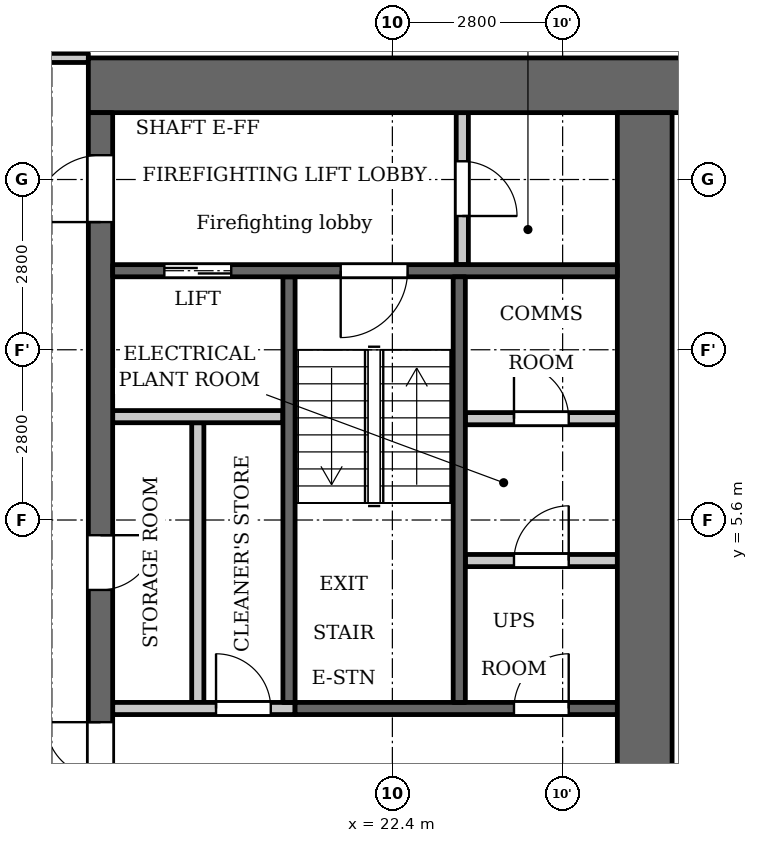
"""IFC4 building model, lengths in metres.
Left out: names, types, materials, properties, quantities, classifications, styles, units other than length and angle.
Written with IfcOpenShell. Run it as: python <this file> out.ifc"""

import sys

from ifc_helpers import new_model, si_unit, direction, frame, frame_2d, origin, place, context, subcontext, project, spatial, rectangle, extrude, element, fill, save


model = new_model("IFC4")
c1 = context("Model", 3, precision=1e-05, world=origin(), true_north=direction((0.0, 1.0)))
c2 = subcontext(c1, "Body", "Model", "MODEL_VIEW")
j1 = project(units=[si_unit("LENGTHUNIT", "METRE"), si_unit("PLANEANGLEUNIT", "RADIAN")], contexts=[c1])
p1 = place(None, origin())
s1 = spatial("IfcSite", under=j1, at=p1, CompositionType="ELEMENT")
p2 = place(p1, origin())
s2 = spatial("IfcBuilding", under=s1, at=p2, CompositionType="ELEMENT")
p3 = place(p2, frame((0.0, 0.0, 44.5)))
s3 = spatial("IfcBuildingStorey", under=s2, at=p3, CompositionType="ELEMENT", Elevation=44.5)
p4 = place(p3, frame((20.7, 2.6, 0.0), z_axis=(0.0, 0.0, 1.0), x_axis=(0.0, 1.0, 0.0)))
e1 = element("IfcWall", 1, at=p4, inside=s3, PredefinedType="SHEAR", context=c2, shape_type="SweptSolid", body=[
    extrude(rectangle(XDim=7.0, YDim=0.2, at=frame_2d((3.5, 0.0))), origin(), (0.0, 0.0, 1.0), 3.2),
])
p5 = place(p3, frame((20.8, 2.5, 0.0), z_axis=(0.0, 0.0, 1.0), x_axis=(1.0, 0.0, 0.0)))
e2 = element("IfcWall", 2, at=p5, inside=s3, PredefinedType="SHEAR", context=c2, shape_type="SweptSolid", body=[
    extrude(rectangle(XDim=5.3, YDim=0.2, at=frame_2d((2.65, 0.0))), origin(), (0.0, 0.0, 1.0), 3.2),
])
p6 = place(p5, frame((3.6, 0.0, 0.0)))
e3 = element("IfcOpeningElement", 3, at=p6, cuts=e2, PredefinedType="OPENING", context=c2, shape_type="SweptSolid", body=[
    extrude(rectangle(XDim=0.9, YDim=2.1, at=frame_2d((0.45, 1.05))), frame((0.0, 0.11, 0.0), z_axis=(0.0, -1.0, 0.0), x_axis=(1.0, 0.0, 0.0)), (0.0, 0.0, 1.0), 0.22),
])
p7 = place(p3, frame((17.4, 12.75, 0.0), z_axis=(0.0, 0.0, 1.0), x_axis=(1.0, 0.0, 0.0)))
e4 = element("IfcWall", 4, at=p7, inside=s3, PredefinedType="SHEAR", context=c2, shape_type="SweptSolid", body=[
    extrude(rectangle(XDim=10.4, YDim=0.9, at=frame_2d((5.2, 0.0))), origin(), (0.0, 0.0, 1.0), 3.2),
])
p8 = place(p3, frame((19.2, 2.6, 0.0), z_axis=(0.0, 0.0, 1.0), x_axis=(0.0, 1.0, 0.0)))
e5 = element("IfcWall", 5, at=p8, inside=s3, PredefinedType="PARTITIONING", context=c2, shape_type="SweptSolid", body=[
    extrude(rectangle(XDim=4.6, YDim=0.2, at=frame_2d((2.3, 0.0))), origin(), (0.0, 0.0, 1.0), 3.2),
])
p9 = place(p3, frame((17.6, -12.3, 0.0), z_axis=(0.0, 0.0, 1.0), x_axis=(0.0, 1.0, 0.0)))
e6 = element("IfcWall", 6, at=p9, inside=s3, PredefinedType="SHEAR", context=c2, shape_type="SweptSolid", body=[
    extrude(rectangle(XDim=24.6, YDim=0.4, at=frame_2d((12.3, 0.0))), origin(), (0.0, 0.0, 1.0), 3.2),
])
p10 = place(p9, frame((6.0, 0.0, 0.0)))
e7 = element("IfcOpeningElement", 7, at=p10, cuts=e6, PredefinedType="OPENING", context=c2, shape_type="SweptSolid", body=[
    extrude(rectangle(XDim=1.1, YDim=2.1, at=frame_2d((0.55, 1.05))), frame((0.0, 0.21, 0.0), z_axis=(0.0, -1.0, 0.0), x_axis=(1.0, 0.0, 0.0)), (0.0, 0.0, 1.0), 0.42),
])
p11 = place(p9, frame((8.4, 0.0, 0.0)))
e8 = element("IfcOpeningElement", 8, at=p11, cuts=e6, PredefinedType="OPENING", context=c2, shape_type="SweptSolid", body=[
    extrude(rectangle(XDim=1.1, YDim=2.1, at=frame_2d((0.55, 1.05))), frame((0.0, 0.21, 0.0), z_axis=(0.0, -1.0, 0.0), x_axis=(1.0, 0.0, 0.0)), (0.0, 0.0, 1.0), 0.42),
])
p12 = place(p9, frame((10.8, 0.0, 0.0)))
e9 = element("IfcOpeningElement", 9, at=p12, cuts=e6, PredefinedType="OPENING", context=c2, shape_type="SweptSolid", body=[
    extrude(rectangle(XDim=1.1, YDim=2.1, at=frame_2d((0.55, 1.05))), frame((0.0, 0.21, 0.0), z_axis=(0.0, -1.0, 0.0), x_axis=(1.0, 0.0, 0.0)), (0.0, 0.0, 1.0), 0.42),
])
p13 = place(p9, frame((16.75, 0.0, 0.0)))
e10 = element("IfcOpeningElement", 10, at=p13, cuts=e6, PredefinedType="OPENING", context=c2, shape_type="SweptSolid", body=[
    extrude(rectangle(XDim=0.9, YDim=2.1, at=frame_2d((0.45, 1.05))), frame((0.0, 0.21, 0.0), z_axis=(0.0, -1.0, 0.0), x_axis=(1.0, 0.0, 0.0)), (0.0, 0.0, 1.0), 0.42),
])
p14 = place(p9, frame((22.8, 0.0, 0.0)))
e11 = element("IfcOpeningElement", 11, at=p14, cuts=e6, PredefinedType="OPENING", context=c2, shape_type="SweptSolid", body=[
    extrude(rectangle(XDim=1.1, YDim=2.1, at=frame_2d((0.55, 1.05))), frame((0.0, 0.21, 0.0), z_axis=(0.0, -1.0, 0.0), x_axis=(1.0, 0.0, 0.0)), (0.0, 0.0, 1.0), 0.42),
])
p15 = place(p9, frame((0.7, 0.0, 0.0)))
e12 = element("IfcOpeningElement", 12, at=p15, cuts=e6, PredefinedType="OPENING", context=c2, shape_type="SweptSolid", body=[
    extrude(rectangle(XDim=1.1, YDim=2.1, at=frame_2d((0.55, 1.05))), frame((0.0, 0.21, 0.0), z_axis=(0.0, -1.0, 0.0), x_axis=(1.0, 0.0, 0.0)), (0.0, 0.0, 1.0), 0.42),
])
p16 = place(p9, frame((12.775, 0.0, 0.0)))
e13 = element("IfcOpeningElement", 13, at=p16, cuts=e6, PredefinedType="OPENING", context=c2, shape_type="SweptSolid", body=[
    extrude(rectangle(XDim=1.8, YDim=2.1, at=frame_2d((0.9, 1.05))), frame((0.0, 0.21, 0.0), z_axis=(0.0, -1.0, 0.0), x_axis=(1.0, 0.0, 0.0)), (0.0, 0.0, 1.0), 0.42),
])
p17 = place(p3, frame((26.55, -12.3, 0.0), z_axis=(0.0, 0.0, 1.0), x_axis=(0.0, 1.0, 0.0)))
e14 = element("IfcWall", 14, at=p17, inside=s3, PredefinedType="SHEAR", context=c2, shape_type="SweptSolid", body=[
    extrude(rectangle(XDim=24.6, YDim=0.9, at=frame_2d((12.3, 0.0))), origin(), (0.0, 0.0, 1.0), 3.2),
])
p18 = place(p3, frame((23.55, 9.8, 0.0), z_axis=(0.0, 0.0, 1.0), x_axis=(0.0, 1.0, 0.0)))
e15 = element("IfcWall", 15, at=p18, inside=s3, PredefinedType="PARTITIONING", context=c2, shape_type="SweptSolid", body=[
    extrude(rectangle(XDim=2.5, YDim=0.2, at=frame_2d((1.25, 0.0))), origin(), (0.0, 0.0, 1.0), 3.2),
])
p19 = place(p18, frame((0.8, 0.0, 0.0)))
e16 = element("IfcOpeningElement", 16, at=p19, cuts=e15, PredefinedType="OPENING", context=c2, shape_type="SweptSolid", body=[
    extrude(rectangle(XDim=0.9, YDim=2.1, at=frame_2d((0.45, 1.05))), frame((0.0, 0.11, 0.0), z_axis=(0.0, -1.0, 0.0), x_axis=(1.0, 0.0, 0.0)), (0.0, 0.0, 1.0), 0.22),
])
p20 = place(p3, frame((23.6, 4.933, 0.0), z_axis=(0.0, 0.0, 1.0), x_axis=(1.0, 0.0, 0.0)))
e17 = element("IfcWall", 17, at=p20, inside=s3, PredefinedType="PARTITIONING", context=c2, shape_type="SweptSolid", body=[
    extrude(rectangle(XDim=2.5, YDim=0.2, at=frame_2d((1.25, 0.0))), origin(), (0.0, 0.0, 1.0), 3.2),
])
p21 = place(p20, frame((0.8, 0.0, 0.0)))
e18 = element("IfcOpeningElement", 18, at=p21, cuts=e17, PredefinedType="OPENING", context=c2, shape_type="SweptSolid", body=[
    extrude(rectangle(XDim=0.9, YDim=2.1, at=frame_2d((0.45, 1.05))), frame((0.0, 0.11, 0.0), z_axis=(0.0, -1.0, 0.0), x_axis=(1.0, 0.0, 0.0)), (0.0, 0.0, 1.0), 0.22),
])
p22 = place(p3, frame((23.6, 7.267, 0.0), z_axis=(0.0, 0.0, 1.0), x_axis=(1.0, 0.0, 0.0)))
e19 = element("IfcWall", 19, at=p22, inside=s3, PredefinedType="PARTITIONING", context=c2, shape_type="SweptSolid", body=[
    extrude(rectangle(XDim=2.5, YDim=0.2, at=frame_2d((1.25, 0.0))), origin(), (0.0, 0.0, 1.0), 3.2),
])
p23 = place(p22, frame((0.8, 0.0, 0.0)))
e20 = element("IfcOpeningElement", 20, at=p23, cuts=e19, PredefinedType="OPENING", context=c2, shape_type="SweptSolid", body=[
    extrude(rectangle(XDim=0.9, YDim=2.1, at=frame_2d((0.45, 1.05))), frame((0.0, 0.11, 0.0), z_axis=(0.0, -1.0, 0.0), x_axis=(1.0, 0.0, 0.0)), (0.0, 0.0, 1.0), 0.22),
])
p24 = place(p3, frame((17.8, 2.5, 0.0), z_axis=(0.0, 0.0, 1.0), x_axis=(1.0, 0.0, 0.0)))
e21 = element("IfcWall", 21, at=p24, inside=s3, PredefinedType="PARTITIONING", context=c2, shape_type="SweptSolid", body=[
    extrude(rectangle(XDim=3.0, YDim=0.2, at=frame_2d((1.5, 0.0))), origin(), (0.0, 0.0, 1.0), 3.2),
])
p25 = place(p24, frame((1.7, 0.0, 0.0)))
e22 = element("IfcOpeningElement", 22, at=p25, cuts=e21, PredefinedType="OPENING", context=c2, shape_type="SweptSolid", body=[
    extrude(rectangle(XDim=0.9, YDim=2.1, at=frame_2d((0.45, 1.05))), frame((0.0, 0.11, 0.0), z_axis=(0.0, -1.0, 0.0), x_axis=(1.0, 0.0, 0.0)), (0.0, 0.0, 1.0), 0.22),
])
p26 = place(p3, frame((17.8, 7.3, 0.0), z_axis=(0.0, 0.0, 1.0), x_axis=(1.0, 0.0, 0.0)))
e23 = element("IfcWall", 23, at=p26, inside=s3, PredefinedType="PARTITIONING", context=c2, shape_type="SweptSolid", body=[
    extrude(rectangle(XDim=2.8, YDim=0.2, at=frame_2d((1.4, 0.0))), origin(), (0.0, 0.0, 1.0), 3.2),
])
p27 = place(p3, frame((17.8, 9.7, 0.0), z_axis=(0.0, 0.0, 1.0), x_axis=(1.0, 0.0, 0.0)))
e24 = element("IfcWall", 24, at=p27, inside=s3, PredefinedType="SHEAR", context=c2, shape_type="SweptSolid", body=[
    extrude(rectangle(XDim=8.3, YDim=0.2, at=frame_2d((4.15, 0.0))), origin(), (0.0, 0.0, 1.0), 3.2),
])
p28 = place(p27, frame((0.85, 0.0, 0.0)))
e25 = element("IfcOpeningElement", 25, at=p28, cuts=e24, PredefinedType="OPENING", context=c2, shape_type="SweptSolid", body=[
    extrude(rectangle(XDim=1.1, YDim=2.1, at=frame_2d((0.55, 1.05))), frame((0.0, 0.11, 0.0), z_axis=(0.0, -1.0, 0.0), x_axis=(1.0, 0.0, 0.0)), (0.0, 0.0, 1.0), 0.22),
])
p29 = place(p27, frame((3.75, 0.0, 0.0)))
e26 = element("IfcOpeningElement", 26, at=p29, cuts=e24, PredefinedType="OPENING", context=c2, shape_type="SweptSolid", body=[
    extrude(rectangle(XDim=1.1, YDim=2.1, at=frame_2d((0.55, 1.05))), frame((0.0, 0.11, 0.0), z_axis=(0.0, -1.0, 0.0), x_axis=(1.0, 0.0, 0.0)), (0.0, 0.0, 1.0), 0.22),
])
p30 = place(p3, frame((23.5, 2.6, 0.0), z_axis=(0.0, 0.0, 1.0), x_axis=(0.0, 1.0, 0.0)))
e27 = element("IfcWall", 27, at=p30, inside=s3, PredefinedType="SHEAR", context=c2, shape_type="SweptSolid", body=[
    extrude(rectangle(XDim=7.0, YDim=0.2, at=frame_2d((3.5, 0.0))), origin(), (0.0, 0.0, 1.0), 3.2),
])
p31 = place(p3, frame((-17.4, 13.2, 0.0), z_axis=(0.0, 0.0, 1.0), x_axis=(1.0, 0.0, 0.0)))
e28 = element("IfcWall", 28, at=p31, inside=s3, PredefinedType="PARTITIONING", context=c2, shape_type="SweptSolid", body=[
    extrude(rectangle(XDim=34.8, YDim=0.15, at=frame_2d((17.4, 0.0))), origin(), (0.0, 0.0, 1.0), 3.2),
])
p32 = place(p31, frame((0.75, 0.0, 0.0)))
e29 = element("IfcOpeningElement", 29, at=p32, cuts=e28, PredefinedType="OPENING", context=c2, shape_type="SweptSolid", body=[
    extrude(rectangle(XDim=1.0, YDim=2.1, at=frame_2d((0.5, 1.05))), frame((0.0, 0.085, 0.0), z_axis=(0.0, -1.0, 0.0), x_axis=(1.0, 0.0, 0.0)), (0.0, 0.0, 1.0), 0.17),
])
p33 = place(p31, frame((33.15, 0.0, 0.0)))
e30 = element("IfcOpeningElement", 30, at=p33, cuts=e28, PredefinedType="OPENING", context=c2, shape_type="SweptSolid", body=[
    extrude(rectangle(XDim=1.0, YDim=2.1, at=frame_2d((0.5, 1.05))), frame((0.0, 0.085, 0.0), z_axis=(0.0, -1.0, 0.0), x_axis=(1.0, 0.0, 0.0)), (0.0, 0.0, 1.0), 0.17),
])
p34 = place(p31, frame((3.05, 0.0, 0.0)))
e31 = element("IfcOpeningElement", 31, at=p34, cuts=e28, PredefinedType="OPENING", context=c2, shape_type="SweptSolid", body=[
    extrude(rectangle(XDim=1.0, YDim=2.1, at=frame_2d((0.5, 1.05))), frame((0.0, 0.085, 0.0), z_axis=(0.0, -1.0, 0.0), x_axis=(1.0, 0.0, 0.0)), (0.0, 0.0, 1.0), 0.17),
])
p35 = place(p31, frame((12.45, 0.0, 0.0)))
e32 = element("IfcOpeningElement", 32, at=p35, cuts=e28, PredefinedType="OPENING", context=c2, shape_type="SweptSolid", body=[
    extrude(rectangle(XDim=1.0, YDim=2.1, at=frame_2d((0.5, 1.05))), frame((0.0, 0.085, 0.0), z_axis=(0.0, -1.0, 0.0), x_axis=(1.0, 0.0, 0.0)), (0.0, 0.0, 1.0), 0.17),
])
p36 = place(p31, frame((18.3, 0.0, 0.0)))
e33 = element("IfcOpeningElement", 33, at=p36, cuts=e28, PredefinedType="OPENING", context=c2, shape_type="SweptSolid", body=[
    extrude(rectangle(XDim=1.0, YDim=2.1, at=frame_2d((0.5, 1.05))), frame((0.0, 0.085, 0.0), z_axis=(0.0, -1.0, 0.0), x_axis=(1.0, 0.0, 0.0)), (0.0, 0.0, 1.0), 0.17),
])
p37 = place(p31, frame((29.25, 0.0, 0.0)))
e34 = element("IfcOpeningElement", 34, at=p37, cuts=e28, PredefinedType="OPENING", context=c2, shape_type="SweptSolid", body=[
    extrude(rectangle(XDim=1.0, YDim=2.1, at=frame_2d((0.5, 1.05))), frame((0.0, 0.085, 0.0), z_axis=(0.0, -1.0, 0.0), x_axis=(1.0, 0.0, 0.0)), (0.0, 0.0, 1.0), 0.17),
])
p38 = place(p13, origin())
e35 = element("IfcDoor", 35, at=p38, inside=s3, OperationType="SINGLE_SWING_RIGHT", PredefinedType="DOOR", context=c2, shape_type="SweptSolid", body=[
    extrude(rectangle(XDim=0.9, YDim=2.1, at=frame_2d((0.45, 1.05))), frame((0.0, 0.025, 0.0), z_axis=(0.0, -1.0, 0.0), x_axis=(1.0, 0.0, 0.0)), (0.0, 0.0, 1.0), 0.05),
])
fill(e10, e35)
p39 = place(p25, origin())
e36 = element("IfcDoor", 36, at=p39, inside=s3, OperationType="SINGLE_SWING_RIGHT", PredefinedType="DOOR", context=c2, shape_type="SweptSolid", body=[
    extrude(rectangle(XDim=0.9, YDim=2.1, at=frame_2d((0.45, 1.05))), frame((0.0, 0.025, 0.0), z_axis=(0.0, -1.0, 0.0), x_axis=(1.0, 0.0, 0.0)), (0.0, 0.0, 1.0), 0.05),
])
fill(e22, e36)
p40 = place(p28, origin())
e37 = element("IfcDoor", 37, at=p40, inside=s3, OperationType="DOUBLE_DOOR_SLIDING", PredefinedType="DOOR", context=c2, shape_type="SweptSolid", body=[
    extrude(rectangle(XDim=1.1, YDim=2.1, at=frame_2d((0.55, 1.05))), frame((0.0, 0.025, 0.0), z_axis=(0.0, -1.0, 0.0), x_axis=(1.0, 0.0, 0.0)), (0.0, 0.0, 1.0), 0.05),
])
fill(e25, e37)
p41 = place(p14, origin())
e38 = element("IfcDoor", 38, at=p41, inside=s3, OperationType="SINGLE_SWING_RIGHT", PredefinedType="DOOR", context=c2, shape_type="SweptSolid", body=[
    extrude(rectangle(XDim=1.1, YDim=2.1, at=frame_2d((0.55, 1.05))), frame((0.0, 0.025, 0.0), z_axis=(0.0, -1.0, 0.0), x_axis=(1.0, 0.0, 0.0)), (0.0, 0.0, 1.0), 0.05),
])
fill(e11, e38)
p42 = place(p19, origin())
e39 = element("IfcDoor", 39, at=p42, inside=s3, OperationType="SINGLE_SWING_LEFT", PredefinedType="DOOR", context=c2, shape_type="SweptSolid", body=[
    extrude(rectangle(XDim=0.9, YDim=2.1, at=frame_2d((0.45, 1.05))), frame((0.0, 0.025, 0.0), z_axis=(0.0, -1.0, 0.0), x_axis=(1.0, 0.0, 0.0)), (0.0, 0.0, 1.0), 0.05),
])
fill(e16, e39)
p43 = place(p29, origin())
e40 = element("IfcDoor", 40, at=p43, inside=s3, OperationType="SINGLE_SWING_LEFT", PredefinedType="DOOR", context=c2, shape_type="SweptSolid", body=[
    extrude(rectangle(XDim=1.1, YDim=2.1, at=frame_2d((0.55, 1.05))), frame((0.0, 0.025, 0.0), z_axis=(0.0, -1.0, 0.0), x_axis=(1.0, 0.0, 0.0)), (0.0, 0.0, 1.0), 0.05),
])
fill(e26, e40)
p44 = place(p16, origin())
e41 = element("IfcDoor", 41, at=p44, inside=s3, OperationType="DOUBLE_DOOR_SINGLE_SWING", PredefinedType="DOOR", context=c2, shape_type="SweptSolid", body=[
    extrude(rectangle(XDim=1.8, YDim=2.1, at=frame_2d((0.9, 1.05))), frame((0.0, 0.025, 0.0), z_axis=(0.0, -1.0, 0.0), x_axis=(1.0, 0.0, 0.0)), (0.0, 0.0, 1.0), 0.05),
])
fill(e13, e41)
p45 = place(p21, origin())
e42 = element("IfcDoor", 42, at=p45, inside=s3, OperationType="SINGLE_SWING_LEFT", PredefinedType="DOOR", context=c2, shape_type="SweptSolid", body=[
    extrude(rectangle(XDim=0.9, YDim=2.1, at=frame_2d((0.45, 1.05))), frame((0.0, 0.025, 0.0), z_axis=(0.0, -1.0, 0.0), x_axis=(1.0, 0.0, 0.0)), (0.0, 0.0, 1.0), 0.05),
])
fill(e18, e42)
p46 = place(p23, origin())
e43 = element("IfcDoor", 43, at=p46, inside=s3, OperationType="SINGLE_SWING_RIGHT", PredefinedType="DOOR", context=c2, shape_type="SweptSolid", body=[
    extrude(rectangle(XDim=0.9, YDim=2.1, at=frame_2d((0.45, 1.05))), frame((0.0, 0.025, 0.0), z_axis=(0.0, -1.0, 0.0), x_axis=(1.0, 0.0, 0.0)), (0.0, 0.0, 1.0), 0.05),
])
fill(e20, e43)
p47 = place(p6, origin())
e44 = element("IfcDoor", 44, at=p47, inside=s3, OperationType="SINGLE_SWING_LEFT", PredefinedType="DOOR", context=c2, shape_type="SweptSolid", body=[
    extrude(rectangle(XDim=0.9, YDim=2.1, at=frame_2d((0.45, 1.05))), frame((0.0, 0.025, 0.0), z_axis=(0.0, -1.0, 0.0), x_axis=(1.0, 0.0, 0.0)), (0.0, 0.0, 1.0), 0.05),
])
fill(e3, e44)
save(model, sys.argv[1])
